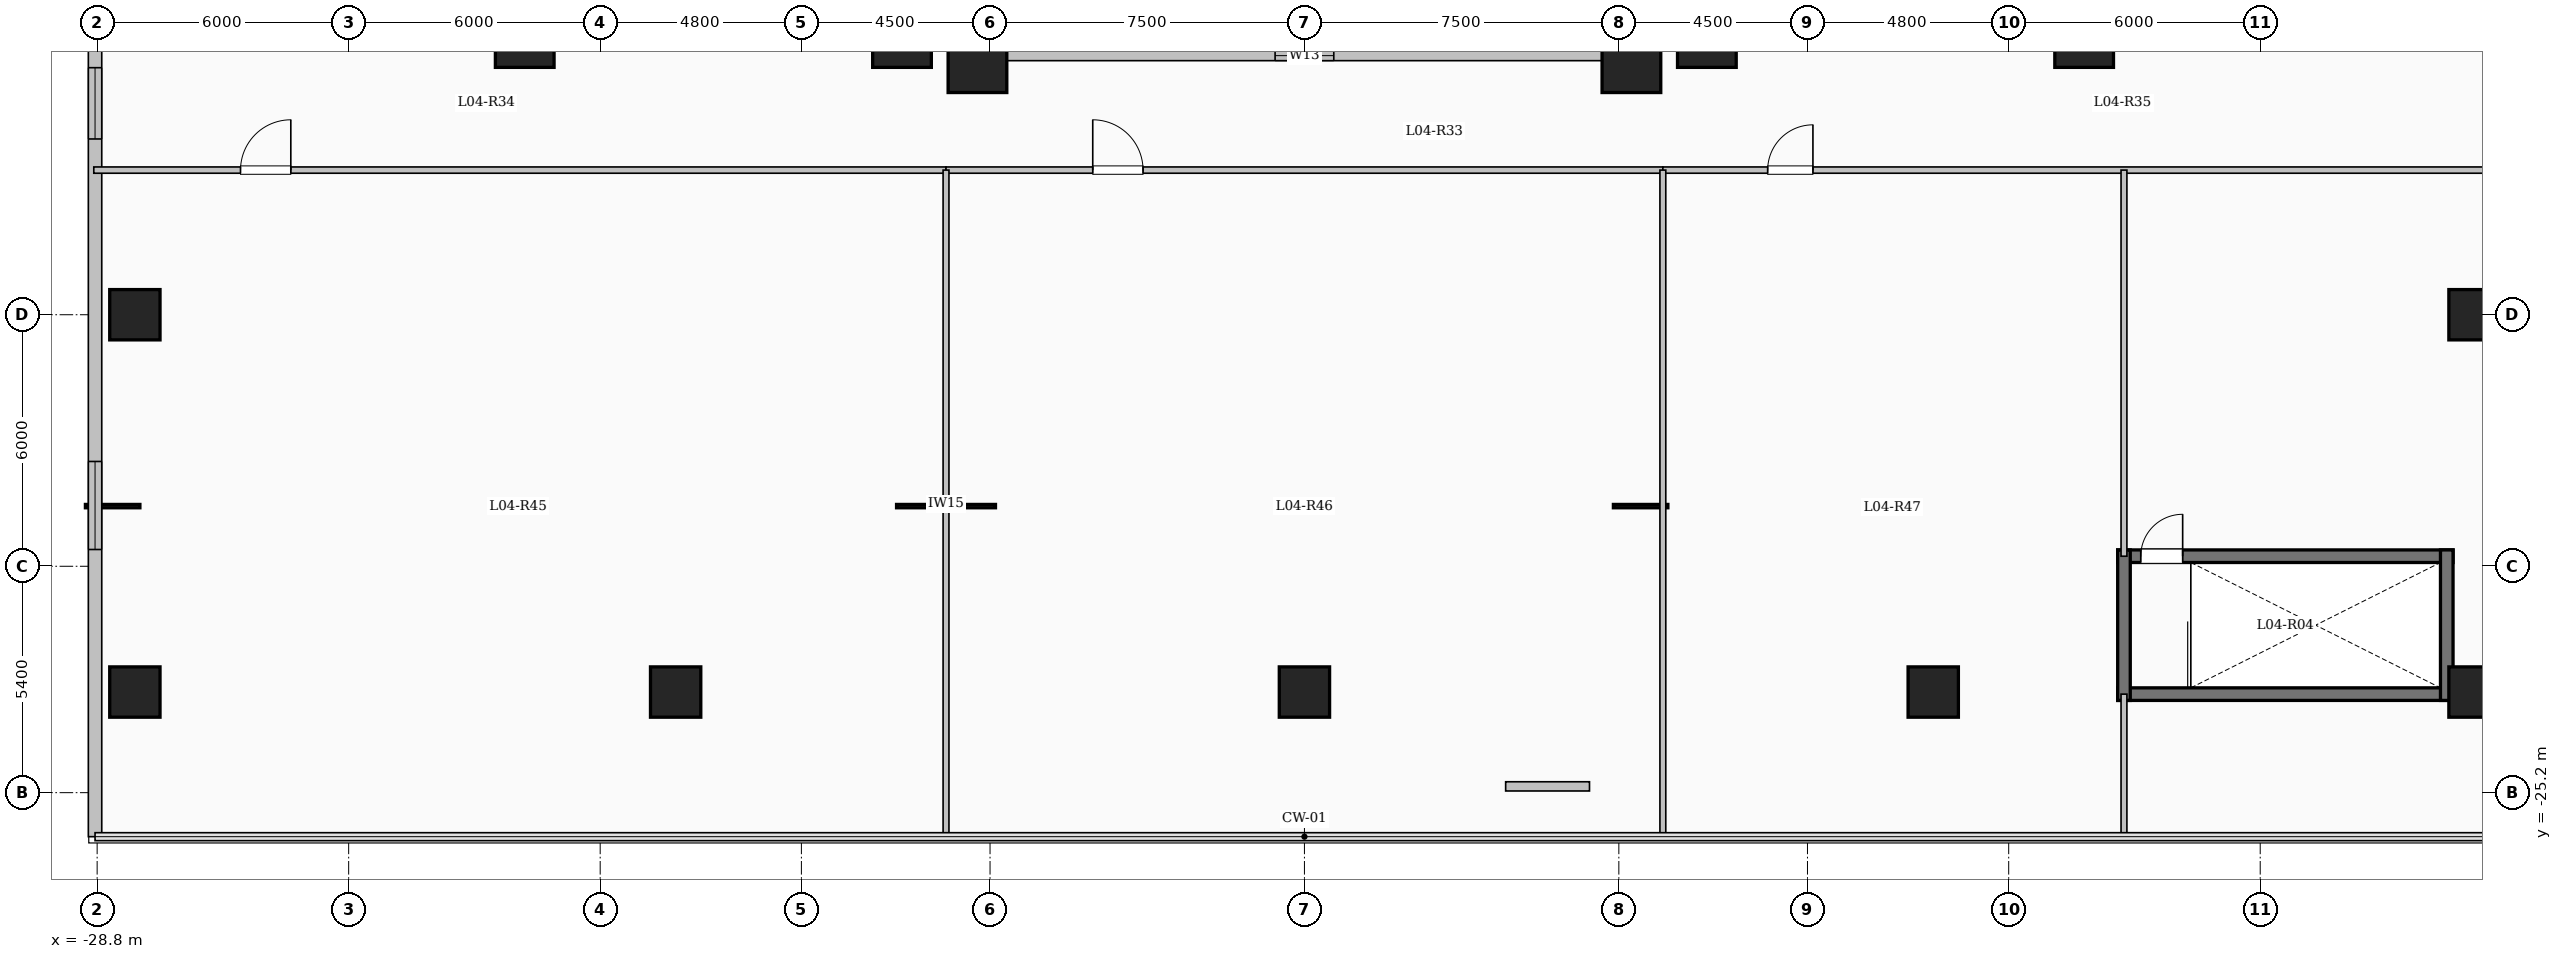
"""IFC4 building model, lengths in metres.
Left out: names, types, materials, properties, quantities, classifications, styles, units other than length and angle.
Written with IfcOpenShell. Run it as: python <this file> out.ifc"""

import sys

from ifc_helpers import new_model, si_unit, direction, frame, frame_2d, origin, origin_2d, place, context, subcontext, project, spatial, rectangle, extrude, element, fill, save


model = new_model("IFC4")
c1 = context("Model", 3, precision=1e-05, world=origin(), true_north=direction((0.0, 1.0)))
c2 = subcontext(c1, "Body", "Model", "MODEL_VIEW")
j1 = project(units=[si_unit("LENGTHUNIT", "METRE"), si_unit("PLANEANGLEUNIT", "RADIAN")], contexts=[c1])
p1 = place(None, origin())
s1 = spatial("IfcSite", under=j1, at=p1, CompositionType="ELEMENT")
p2 = place(p1, origin())
s2 = spatial("IfcBuilding", under=s1, at=p2, CompositionType="ELEMENT")
p3 = place(p2, frame((0.0, 0.0, 18.9)))
s3 = spatial("IfcBuildingStorey", under=s2, at=p3, CompositionType="ELEMENT", Elevation=18.9)
for number, where, z_axis, x_axis in (
    (1, (-7.8, -7.8, 0.0), (0.0, 0.0, 1.0), (1.0, 0.0, 0.0)),
    (2, (7.8, -7.8, 0.0), (0.0, 0.0, 1.0), (1.0, 0.0, 0.0)),
    (3, (-9.6, -7.2, 0.0), (0.0, 0.0, 1.0), (1.0, 0.0, 0.0)),
    (4, (9.6, -7.2, 0.0), (0.0, 0.0, 1.0), (1.0, 0.0, 0.0)),
    (5, (-18.6, -7.2, 0.0), (0.0, 0.0, 1.0), (1.0, 0.0, 0.0)),
    (6, (18.6, -7.2, 0.0), (0.0, 0.0, 1.0), (1.0, 0.0, 0.0)),
):
    element("IfcColumn", number, at=place(p3, frame(where, z_axis=z_axis, x_axis=x_axis)), inside=s3, PredefinedType="COLUMN", context=c2, shape_type="SweptSolid", body=[
        extrude(rectangle(XDim=1.4, YDim=1.4, at=origin_2d()), origin(), (0.0, 0.0, 1.0), 5.1),
    ])
for number, where, z_axis, x_axis in (
    (7, (-27.9, -22.8, 0.0), (0.0, 0.0, 1.0), (1.0, 0.0, 0.0)),
    (8, (-15.0, -22.8, 0.0), (0.0, 0.0, 1.0), (1.0, 0.0, 0.0)),
    (9, (0.0, -22.8, 0.0), (0.0, 0.0, 1.0), (1.0, 0.0, 0.0)),
    (10, (15.0, -22.8, 0.0), (0.0, 0.0, 1.0), (1.0, 0.0, 0.0)),
    (11, (27.9, -22.8, 0.0), (0.0, 0.0, 1.0), (1.0, 0.0, 0.0)),
    (12, (-27.9, -13.8, 0.0), (0.0, 0.0, 1.0), (1.0, 0.0, 0.0)),
    (13, (27.9, -13.8, 0.0), (0.0, 0.0, 1.0), (1.0, 0.0, 0.0)),
):
    element("IfcColumn", number, at=place(p3, frame(where, z_axis=z_axis, x_axis=x_axis)), inside=s3, PredefinedType="COLUMN", context=c2, shape_type="SweptSolid", body=[
        extrude(rectangle(XDim=1.2, YDim=1.2, at=origin_2d()), origin(), (0.0, 0.0, 1.0), 5.1),
    ])
p4 = place(p3, frame((-7.62, -7.62, 0.0), z_axis=(0.0, 0.0, 1.0), x_axis=(1.0, 0.0, 0.0)))
e14 = element("IfcWall", 14, at=p4, inside=s3, PredefinedType="SOLIDWALL", context=c2, shape_type="SweptSolid", body=[
    extrude(rectangle(XDim=15.24, YDim=0.24, at=frame_2d((7.62, 0.0))), origin(), (0.0, 0.0, 1.0), 4.85),
])
p5 = place(p4, frame((6.92, 0.0, 0.95)))
e15 = element("IfcOpeningElement", 15, at=p5, cuts=e14, PredefinedType="OPENING", context=c2, shape_type="SweptSolid", body=[
    extrude(rectangle(XDim=1.4, YDim=1.5, at=frame_2d((0.7, 0.75))), frame((0.0, 0.13, 0.0), z_axis=(0.0, -1.0, 0.0), x_axis=(1.0, 0.0, 0.0)), (0.0, 0.0, 1.0), 0.26),
])
p6 = place(p3, frame((7.62, -7.62, 0.0), z_axis=(0.0, 0.0, 1.0), x_axis=(0.0, 1.0, 0.0)))
e16 = element("IfcWall", 16, at=p6, inside=s3, PredefinedType="SOLIDWALL", context=c2, shape_type="SweptSolid", body=[
    extrude(rectangle(XDim=15.24, YDim=0.24, at=frame_2d((7.62, 0.0))), origin(), (0.0, 0.0, 1.0), 4.85),
])
p7 = place(p6, frame((6.92, 0.0, 0.95)))
e17 = element("IfcOpeningElement", 17, at=p7, cuts=e16, PredefinedType="OPENING", context=c2, shape_type="SweptSolid", body=[
    extrude(rectangle(XDim=1.4, YDim=1.5, at=frame_2d((0.7, 0.75))), frame((0.0, 0.13, 0.0), z_axis=(0.0, -1.0, 0.0), x_axis=(1.0, 0.0, 0.0)), (0.0, 0.0, 1.0), 0.26),
])
p8 = place(p3, frame((-7.62, 7.62, 0.0), z_axis=(0.0, 0.0, 1.0), x_axis=(0.0, -1.0, 0.0)))
e18 = element("IfcWall", 18, at=p8, inside=s3, PredefinedType="SOLIDWALL", context=c2, shape_type="SweptSolid", body=[
    extrude(rectangle(XDim=15.24, YDim=0.24, at=frame_2d((7.62, 0.0))), origin(), (0.0, 0.0, 1.0), 4.85),
])
p9 = place(p8, frame((6.92, 0.0, 0.95)))
e19 = element("IfcOpeningElement", 19, at=p9, cuts=e18, PredefinedType="OPENING", context=c2, shape_type="SweptSolid", body=[
    extrude(rectangle(XDim=1.4, YDim=1.5, at=frame_2d((0.7, 0.75))), frame((0.0, 0.13, 0.0), z_axis=(0.0, -1.0, 0.0), x_axis=(1.0, 0.0, 0.0)), (0.0, 0.0, 1.0), 0.26),
])
p10 = place(p3, frame((-28.85, -26.25, 0.0), z_axis=(0.0, 0.0, 1.0), x_axis=(0.0, 1.0, 0.0)))
e20 = element("IfcWall", 20, at=p10, inside=s3, PredefinedType="SOLIDWALL", context=c2, shape_type="SweptSolid", body=[
    extrude(rectangle(XDim=52.5, YDim=0.32, at=frame_2d((26.25, 0.0))), origin(), (0.0, 0.0, 1.0), 4.85),
])
p11 = place(p10, frame((6.85, 0.0, 0.9)))
e21 = element("IfcOpeningElement", 21, at=p11, cuts=e20, PredefinedType="OPENING", context=c2, shape_type="SweptSolid", body=[
    extrude(rectangle(XDim=2.1, YDim=2.0, at=frame_2d((1.05, 1.0))), frame((0.0, 0.17, 0.0), z_axis=(0.0, -1.0, 0.0), x_axis=(1.0, 0.0, 0.0)), (0.0, 0.0, 1.0), 0.34),
])
p12 = place(p10, frame((16.643, 0.0, 0.9)))
e22 = element("IfcOpeningElement", 22, at=p12, cuts=e20, PredefinedType="OPENING", context=c2, shape_type="SweptSolid", body=[
    extrude(rectangle(XDim=1.7, YDim=1.9, at=frame_2d((0.85, 0.95))), frame((0.0, 0.17, 0.0), z_axis=(0.0, -1.0, 0.0), x_axis=(1.0, 0.0, 0.0)), (0.0, 0.0, 1.0), 0.34),
])
p13 = place(p10, frame((26.95, 0.0, 0.9)))
e23 = element("IfcOpeningElement", 23, at=p13, cuts=e20, PredefinedType="OPENING", context=c2, shape_type="SweptSolid", body=[
    extrude(rectangle(XDim=2.1, YDim=2.0, at=frame_2d((1.05, 1.0))), frame((0.0, 0.17, 0.0), z_axis=(0.0, -1.0, 0.0), x_axis=(1.0, 0.0, 0.0)), (0.0, 0.0, 1.0), 0.34),
])
p14 = place(p10, frame((37.375, 0.0, 0.95)))
e24 = element("IfcOpeningElement", 24, at=p14, cuts=e20, PredefinedType="OPENING", context=c2, shape_type="SweptSolid", body=[
    extrude(rectangle(XDim=1.0, YDim=1.5, at=frame_2d((0.5, 0.75))), frame((0.0, 0.17, 0.0), z_axis=(0.0, -1.0, 0.0), x_axis=(1.0, 0.0, 0.0)), (0.0, 0.0, 1.0), 0.34),
])
p15 = place(p10, frame((44.6, 0.0, 0.9)))
e25 = element("IfcOpeningElement", 25, at=p15, cuts=e20, PredefinedType="OPENING", context=c2, shape_type="SweptSolid", body=[
    extrude(rectangle(XDim=2.1, YDim=2.0, at=frame_2d((1.05, 1.0))), frame((0.0, 0.17, 0.0), z_axis=(0.0, -1.0, 0.0), x_axis=(1.0, 0.0, 0.0)), (0.0, 0.0, 1.0), 0.34),
])
p16 = place(p3, frame((4.8, -25.05, 0.0), z_axis=(0.0, 0.0, 1.0), x_axis=(1.0, 0.0, 0.0)))
e26 = element("IfcWall", 26, at=p16, inside=s3, PredefinedType="PARAPET", context=c2, shape_type="SweptSolid", body=[
    extrude(rectangle(XDim=2.0, YDim=0.22, at=frame_2d((1.0, 0.0))), origin(), (0.0, 0.0, 1.0), 0.85),
])
p17 = place(p3, frame((19.4, -19.56, 0.0), z_axis=(0.0, 0.0, 1.0), x_axis=(1.0, 0.0, 0.0)))
e27 = element("IfcWall", 27, at=p17, inside=s3, PredefinedType="SHEAR", context=c2, shape_type="SweptSolid", body=[
    extrude(rectangle(XDim=8.0, YDim=0.3, at=frame_2d((4.0, 0.0))), origin(), (0.0, 0.0, 1.0), 5.1),
])
p18 = place(p17, frame((0.55, 0.0, 0.0)))
e28 = element("IfcOpeningElement", 28, at=p18, cuts=e27, PredefinedType="OPENING", context=c2, shape_type="SweptSolid", body=[
    extrude(rectangle(XDim=1.0, YDim=2.15, at=frame_2d((0.5, 1.075))), frame((0.0, 0.16, 0.0), z_axis=(0.0, -1.0, 0.0), x_axis=(1.0, 0.0, 0.0)), (0.0, 0.0, 1.0), 0.32),
])
p19 = place(p3, frame((19.4, -22.85, 0.0), z_axis=(0.0, 0.0, 1.0), x_axis=(1.0, 0.0, 0.0)))
e29 = element("IfcWall", 29, at=p19, inside=s3, PredefinedType="SHEAR", context=c2, shape_type="SweptSolid", body=[
    extrude(rectangle(XDim=8.0, YDim=0.3, at=frame_2d((4.0, 0.0))), origin(), (0.0, 0.0, 1.0), 5.1),
])
for number, where, z_axis, x_axis in (
    (30, (19.55, -23.0, 0.0), (0.0, 0.0, 1.0), (0.0, 1.0, 0.0)),
    (31, (27.25, -23.0, 0.0), (0.0, 0.0, 1.0), (0.0, 1.0, 0.0)),
):
    element("IfcWall", number, at=place(p3, frame(where, z_axis=z_axis, x_axis=x_axis)), inside=s3, PredefinedType="SHEAR", context=c2, shape_type="SweptSolid", body=[
        extrude(rectangle(XDim=3.59, YDim=0.3, at=frame_2d((1.795, 0.0))), origin(), (0.0, 0.0, 1.0), 5.1),
    ])
p20 = place(p3, frame((-28.88, -10.35, 0.0), z_axis=(0.0, 0.0, 1.0), x_axis=(1.0, 0.0, 0.0)))
e32 = element("IfcWall", 32, at=p20, inside=s3, PredefinedType="PARTITIONING", context=c2, shape_type="SweptSolid", body=[
    extrude(rectangle(XDim=20.33, YDim=0.15, at=frame_2d((10.165, 0.0))), origin(), (0.0, 0.0, 1.0), 4.85),
])
p21 = place(p20, frame((3.5, 0.0, 0.0)))
e33 = element("IfcOpeningElement", 33, at=p21, cuts=e32, PredefinedType="OPENING", context=c2, shape_type="SweptSolid", body=[
    extrude(rectangle(XDim=1.2, YDim=2.15, at=frame_2d((0.6, 1.075))), frame((0.0, 0.085, 0.0), z_axis=(0.0, -1.0, 0.0), x_axis=(1.0, 0.0, 0.0)), (0.0, 0.0, 1.0), 0.17),
])
p22 = place(p3, frame((-8.55, -10.35, 0.0), z_axis=(0.0, 0.0, 1.0), x_axis=(1.0, 0.0, 0.0)))
e34 = element("IfcWall", 34, at=p22, inside=s3, PredefinedType="PARTITIONING", context=c2, shape_type="SweptSolid", body=[
    extrude(rectangle(XDim=17.1, YDim=0.15, at=frame_2d((8.55, 0.0))), origin(), (0.0, 0.0, 1.0), 4.85),
])
p23 = place(p22, frame((3.5, 0.0, 0.0)))
e35 = element("IfcOpeningElement", 35, at=p23, cuts=e34, PredefinedType="OPENING", context=c2, shape_type="SweptSolid", body=[
    extrude(rectangle(XDim=1.2, YDim=2.15, at=frame_2d((0.6, 1.075))), frame((0.0, 0.085, 0.0), z_axis=(0.0, -1.0, 0.0), x_axis=(1.0, 0.0, 0.0)), (0.0, 0.0, 1.0), 0.17),
])
p24 = place(p3, frame((8.55, -10.35, 0.0), z_axis=(0.0, 0.0, 1.0), x_axis=(1.0, 0.0, 0.0)))
e36 = element("IfcWall", 36, at=p24, inside=s3, PredefinedType="PARTITIONING", context=c2, shape_type="SweptSolid", body=[
    extrude(rectangle(XDim=20.33, YDim=0.15, at=frame_2d((10.165, 0.0))), origin(), (0.0, 0.0, 1.0), 4.85),
])
p25 = place(p24, frame((2.5, 0.0, 0.0)))
e37 = element("IfcOpeningElement", 37, at=p25, cuts=e36, PredefinedType="OPENING", context=c2, shape_type="SweptSolid", body=[
    extrude(rectangle(XDim=1.08, YDim=2.15, at=frame_2d((0.54, 1.075))), frame((0.0, 0.085, 0.0), z_axis=(0.0, -1.0, 0.0), x_axis=(1.0, 0.0, 0.0)), (0.0, 0.0, 1.0), 0.17),
])
for number, where, z_axis, x_axis in (
    (38, (-8.55, -26.28, 0.0), (0.0, 0.0, 1.0), (0.0, 1.0, 0.0)),
    (39, (8.55, -26.28, 0.0), (0.0, 0.0, 1.0), (0.0, 1.0, 0.0)),
):
    element("IfcWall", number, at=place(p3, frame(where, z_axis=z_axis, x_axis=x_axis)), inside=s3, PredefinedType="PARTITIONING", context=c2, shape_type="SweptSolid", body=[
        extrude(rectangle(XDim=15.93, YDim=0.14, at=frame_2d((7.965, 0.0))), origin(), (0.0, 0.0, 1.0), 4.85),
    ])
p26 = place(p3, frame((19.55, -26.28, 0.0), z_axis=(0.0, 0.0, 1.0), x_axis=(0.0, 1.0, 0.0)))
e40 = element("IfcWall", 40, at=p26, inside=s3, PredefinedType="PARTITIONING", context=c2, shape_type="SweptSolid", body=[
    extrude(rectangle(XDim=3.43, YDim=0.14, at=frame_2d((1.715, 0.0))), origin(), (0.0, 0.0, 1.0), 4.85),
])
p27 = place(p3, frame((19.55, -19.56, 0.0), z_axis=(0.0, 0.0, 1.0), x_axis=(0.0, 1.0, 0.0)))
e41 = element("IfcWall", 41, at=p27, inside=s3, PredefinedType="PARTITIONING", context=c2, shape_type="SweptSolid", body=[
    extrude(rectangle(XDim=9.21, YDim=0.14, at=frame_2d((4.605, 0.0))), origin(), (0.0, 0.0, 1.0), 4.85),
])
p28 = place(p5, origin())
e42 = element("IfcWindow", 42, at=p28, inside=s3, PartitioningType="SINGLE_PANEL", PredefinedType="WINDOW", context=c2, shape_type="SweptSolid", body=[
    extrude(rectangle(XDim=1.4, YDim=1.5, at=frame_2d((0.7, 0.75))), frame((0.0, 0.03, 0.0), z_axis=(0.0, -1.0, 0.0), x_axis=(1.0, 0.0, 0.0)), (0.0, 0.0, 1.0), 0.06),
])
fill(e15, e42)
p29 = place(p11, origin())
e43 = element("IfcWindow", 43, at=p29, inside=s3, PartitioningType="SINGLE_PANEL", PredefinedType="WINDOW", context=c2, shape_type="SweptSolid", body=[
    extrude(rectangle(XDim=2.1, YDim=2.0, at=frame_2d((1.05, 1.0))), frame((0.0, 0.03, 0.0), z_axis=(0.0, -1.0, 0.0), x_axis=(1.0, 0.0, 0.0)), (0.0, 0.0, 1.0), 0.06),
])
fill(e21, e43)
p30 = place(p12, origin())
e44 = element("IfcWindow", 44, at=p30, inside=s3, PartitioningType="SINGLE_PANEL", PredefinedType="WINDOW", context=c2, shape_type="SweptSolid", body=[
    extrude(rectangle(XDim=1.7, YDim=1.9, at=frame_2d((0.85, 0.95))), frame((0.0, 0.03, 0.0), z_axis=(0.0, -1.0, 0.0), x_axis=(1.0, 0.0, 0.0)), (0.0, 0.0, 1.0), 0.06),
])
fill(e22, e44)
p31 = place(p18, origin())
e45 = element("IfcDoor", 45, at=p31, inside=s3, OperationType="SINGLE_SWING_RIGHT", PredefinedType="DOOR", context=c2, shape_type="SweptSolid", body=[
    extrude(rectangle(XDim=1.0, YDim=2.15, at=frame_2d((0.5, 1.075))), frame((0.0, 0.025, 0.0), z_axis=(0.0, -1.0, 0.0), x_axis=(1.0, 0.0, 0.0)), (0.0, 0.0, 1.0), 0.05),
])
fill(e28, e45)
p32 = place(p21, origin())
e46 = element("IfcDoor", 46, at=p32, inside=s3, OperationType="SINGLE_SWING_RIGHT", PredefinedType="DOOR", context=c2, shape_type="SweptSolid", body=[
    extrude(rectangle(XDim=1.2, YDim=2.15, at=frame_2d((0.6, 1.075))), frame((0.0, 0.025, 0.0), z_axis=(0.0, -1.0, 0.0), x_axis=(1.0, 0.0, 0.0)), (0.0, 0.0, 1.0), 0.05),
])
fill(e33, e46)
p33 = place(p23, origin())
e47 = element("IfcDoor", 47, at=p33, inside=s3, OperationType="SINGLE_SWING_LEFT", PredefinedType="DOOR", context=c2, shape_type="SweptSolid", body=[
    extrude(rectangle(XDim=1.2, YDim=2.15, at=frame_2d((0.6, 1.075))), frame((0.0, 0.025, 0.0), z_axis=(0.0, -1.0, 0.0), x_axis=(1.0, 0.0, 0.0)), (0.0, 0.0, 1.0), 0.05),
])
fill(e35, e47)
p34 = place(p25, origin())
e48 = element("IfcDoor", 48, at=p34, inside=s3, OperationType="SINGLE_SWING_RIGHT", PredefinedType="DOOR", context=c2, shape_type="SweptSolid", body=[
    extrude(rectangle(XDim=1.08, YDim=2.15, at=frame_2d((0.54, 1.075))), frame((0.0, 0.025, 0.0), z_axis=(0.0, -1.0, 0.0), x_axis=(1.0, 0.0, 0.0)), (0.0, 0.0, 1.0), 0.05),
])
fill(e37, e48)
save(model, sys.argv[1])
